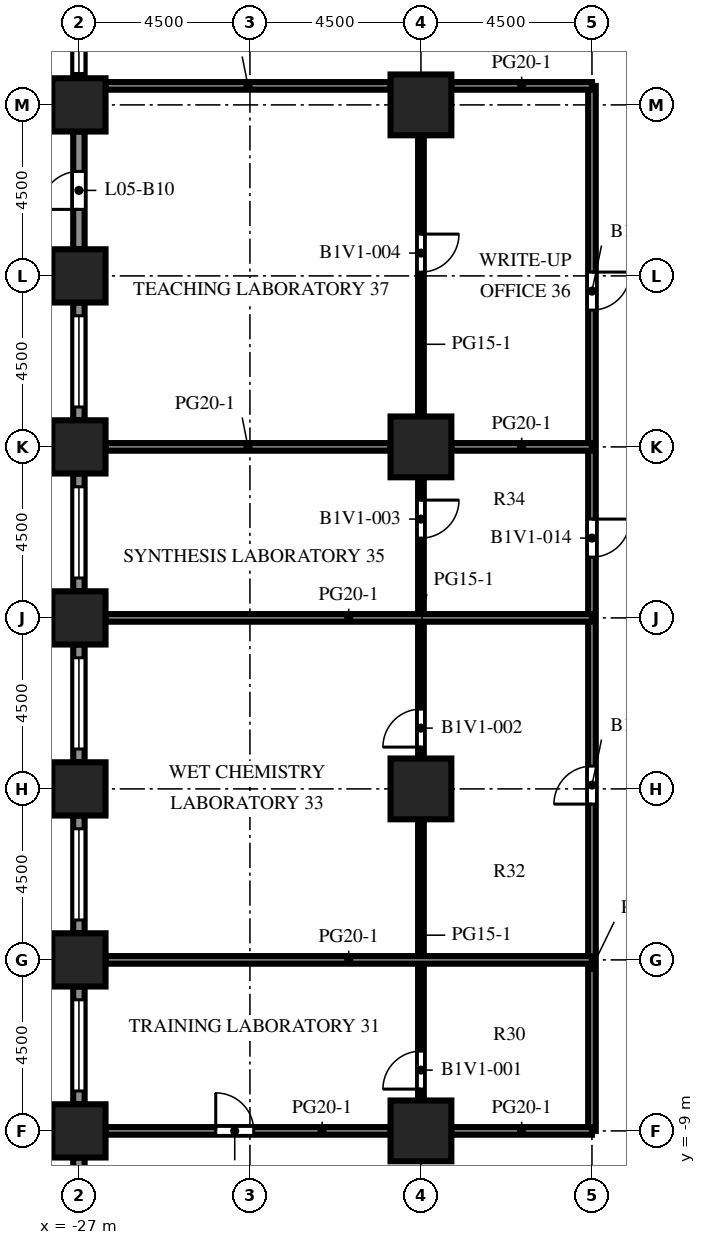
"""IFC4 building model, lengths in metres.
Left out: names, types, materials, properties, quantities, classifications, styles, units other than length and angle.
Written with IfcOpenShell. Run it as: python <this file> out.ifc"""

import sys

from ifc_helpers import new_model, si_unit, direction, frame, frame_2d, origin, origin_2d, place, context, subcontext, project, spatial, rectangle, extrude, element, fill, save


model = new_model("IFC4")
c1 = context("Model", 3, precision=1e-05, world=origin(), true_north=direction((0.0, 1.0)))
c2 = subcontext(c1, "Body", "Model", "MODEL_VIEW")
j1 = project(units=[si_unit("LENGTHUNIT", "METRE"), si_unit("PLANEANGLEUNIT", "RADIAN")], contexts=[c1])
p1 = place(None, origin())
s1 = spatial("IfcSite", under=j1, at=p1, CompositionType="ELEMENT")
p2 = place(p1, origin())
s2 = spatial("IfcBuilding", under=s1, at=p2, CompositionType="ELEMENT")
p3 = place(p2, frame((0.0, 0.0, 23.6)))
s3 = spatial("IfcBuildingStorey", under=s2, at=p3, CompositionType="ELEMENT", Elevation=23.6)
for number, where, z_axis, x_axis in (
    (1, (-27.0, -9.0, 0.0), (0.0, 0.0, 1.0), (1.0, 0.0, 0.0)),
    (2, (-27.0, -4.5, 0.0), (0.0, 0.0, 1.0), (1.0, 0.0, 0.0)),
    (3, (-27.0, 0.0, 0.0), (0.0, 0.0, 1.0), (1.0, 0.0, 0.0)),
    (4, (-27.0, 4.5, 0.0), (0.0, 0.0, 1.0), (1.0, 0.0, 0.0)),
    (5, (-27.0, 9.0, 0.0), (0.0, 0.0, 1.0), (1.0, 0.0, 0.0)),
    (6, (-27.0, 13.5, 0.0), (0.0, 0.0, 1.0), (1.0, 0.0, 0.0)),
    (7, (-27.0, 18.0, 0.0), (0.0, 0.0, 1.0), (1.0, 0.0, 0.0)),
):
    element("IfcColumn", number, at=place(p3, frame(where, z_axis=z_axis, x_axis=x_axis)), inside=s3, PredefinedType="COLUMN", context=c2, shape_type="SweptSolid", body=[
        extrude(rectangle(XDim=1.4, YDim=1.4, at=origin_2d()), origin(), (0.0, 0.0, 1.0), 4.1),
    ])
for number, where, z_axis, x_axis in (
    (8, (-18.0, -9.0, 0.0), (0.0, 0.0, 1.0), (1.0, 0.0, 0.0)),
    (9, (-18.0, 0.0, 0.0), (0.0, 0.0, 1.0), (1.0, 0.0, 0.0)),
    (10, (-18.0, 9.0, 0.0), (0.0, 0.0, 1.0), (1.0, 0.0, 0.0)),
    (11, (-18.0, 18.0, 0.0), (0.0, 0.0, 1.0), (1.0, 0.0, 0.0)),
):
    element("IfcColumn", number, at=place(p3, frame(where, z_axis=z_axis, x_axis=x_axis)), inside=s3, PredefinedType="COLUMN", context=c2, shape_type="SweptSolid", body=[
        extrude(rectangle(XDim=1.6, YDim=1.6, at=origin_2d()), origin(), (0.0, 0.0, 1.0), 4.1),
    ])
p4 = place(p3, frame((-27.0, 18.7, 0.0), z_axis=(0.0, 0.0, 1.0), x_axis=(0.0, 1.0, 0.0)))
e12 = element("IfcWall", 12, at=p4, inside=s3, PredefinedType="SOLIDWALL", context=c2, shape_type="SweptSolid", body=[
    extrude(rectangle(XDim=3.1, YDim=0.3, at=frame_2d((1.55, 0.0))), origin(), (0.0, 0.0, 1.0), 2.75),
])
p5 = place(p4, frame((0.125, 0.0, 0.8)))
e13 = element("IfcOpeningElement", 13, at=p5, cuts=e12, PredefinedType="OPENING", context=c2, shape_type="SweptSolid", body=[
    extrude(rectangle(XDim=2.4, YDim=1.7, at=frame_2d((1.2, 0.85))), frame((0.0, 0.16, 0.0), z_axis=(0.0, -1.0, 0.0), x_axis=(1.0, 0.0, 0.0)), (0.0, 0.0, 1.0), 0.32),
])
p6 = place(p3, frame((-27.0, 14.2, 0.0), z_axis=(0.0, 0.0, 1.0), x_axis=(0.0, 1.0, 0.0)))
e14 = element("IfcWall", 14, at=p6, inside=s3, PredefinedType="SOLIDWALL", context=c2, shape_type="SweptSolid", body=[
    extrude(rectangle(XDim=3.1, YDim=0.3, at=frame_2d((1.55, 0.0))), origin(), (0.0, 0.0, 1.0), 2.75),
])
p7 = place(p6, frame((1.05, 0.0, 0.0)))
e15 = element("IfcOpeningElement", 15, at=p7, cuts=e14, PredefinedType="OPENING", context=c2, shape_type="SweptSolid", body=[
    extrude(rectangle(XDim=1.0, YDim=2.2, at=frame_2d((0.5, 1.1))), frame((0.0, 0.16, 0.0), z_axis=(0.0, -1.0, 0.0), x_axis=(1.0, 0.0, 0.0)), (0.0, 0.0, 1.0), 0.32),
])
p8 = place(p3, frame((-27.0, 9.7, 0.0), z_axis=(0.0, 0.0, 1.0), x_axis=(0.0, 1.0, 0.0)))
e16 = element("IfcWall", 16, at=p8, inside=s3, PredefinedType="SOLIDWALL", context=c2, shape_type="SweptSolid", body=[
    extrude(rectangle(XDim=3.1, YDim=0.3, at=frame_2d((1.55, 0.0))), origin(), (0.0, 0.0, 1.0), 2.75),
])
p9 = place(p8, frame((0.35, 0.0, 0.8)))
e17 = element("IfcOpeningElement", 17, at=p9, cuts=e16, PredefinedType="OPENING", context=c2, shape_type="SweptSolid", body=[
    extrude(rectangle(XDim=2.4, YDim=1.7, at=frame_2d((1.2, 0.85))), frame((0.0, 0.16, 0.0), z_axis=(0.0, -1.0, 0.0), x_axis=(1.0, 0.0, 0.0)), (0.0, 0.0, 1.0), 0.32),
])
p10 = place(p3, frame((-27.0, 5.2, 0.0), z_axis=(0.0, 0.0, 1.0), x_axis=(0.0, 1.0, 0.0)))
e18 = element("IfcWall", 18, at=p10, inside=s3, PredefinedType="SOLIDWALL", context=c2, shape_type="SweptSolid", body=[
    extrude(rectangle(XDim=3.1, YDim=0.3, at=frame_2d((1.55, 0.0))), origin(), (0.0, 0.0, 1.0), 2.75),
])
p11 = place(p10, frame((0.35, 0.0, 0.8)))
e19 = element("IfcOpeningElement", 19, at=p11, cuts=e18, PredefinedType="OPENING", context=c2, shape_type="SweptSolid", body=[
    extrude(rectangle(XDim=2.4, YDim=1.7, at=frame_2d((1.2, 0.85))), frame((0.0, 0.16, 0.0), z_axis=(0.0, -1.0, 0.0), x_axis=(1.0, 0.0, 0.0)), (0.0, 0.0, 1.0), 0.32),
])
p12 = place(p3, frame((-27.0, 0.7, 0.0), z_axis=(0.0, 0.0, 1.0), x_axis=(0.0, 1.0, 0.0)))
e20 = element("IfcWall", 20, at=p12, inside=s3, PredefinedType="SOLIDWALL", context=c2, shape_type="SweptSolid", body=[
    extrude(rectangle(XDim=3.1, YDim=0.3, at=frame_2d((1.55, 0.0))), origin(), (0.0, 0.0, 1.0), 2.75),
])
p13 = place(p12, frame((0.35, 0.0, 0.8)))
e21 = element("IfcOpeningElement", 21, at=p13, cuts=e20, PredefinedType="OPENING", context=c2, shape_type="SweptSolid", body=[
    extrude(rectangle(XDim=2.4, YDim=1.7, at=frame_2d((1.2, 0.85))), frame((0.0, 0.16, 0.0), z_axis=(0.0, -1.0, 0.0), x_axis=(1.0, 0.0, 0.0)), (0.0, 0.0, 1.0), 0.32),
])
p14 = place(p3, frame((-27.0, -3.8, 0.0), z_axis=(0.0, 0.0, 1.0), x_axis=(0.0, 1.0, 0.0)))
e22 = element("IfcWall", 22, at=p14, inside=s3, PredefinedType="SOLIDWALL", context=c2, shape_type="SweptSolid", body=[
    extrude(rectangle(XDim=3.1, YDim=0.3, at=frame_2d((1.55, 0.0))), origin(), (0.0, 0.0, 1.0), 2.75),
])
p15 = place(p14, frame((0.35, 0.0, 0.8)))
e23 = element("IfcOpeningElement", 23, at=p15, cuts=e22, PredefinedType="OPENING", context=c2, shape_type="SweptSolid", body=[
    extrude(rectangle(XDim=2.4, YDim=1.7, at=frame_2d((1.2, 0.85))), frame((0.0, 0.16, 0.0), z_axis=(0.0, -1.0, 0.0), x_axis=(1.0, 0.0, 0.0)), (0.0, 0.0, 1.0), 0.32),
])
p16 = place(p3, frame((-27.0, -8.3, 0.0), z_axis=(0.0, 0.0, 1.0), x_axis=(0.0, 1.0, 0.0)))
e24 = element("IfcWall", 24, at=p16, inside=s3, PredefinedType="SOLIDWALL", context=c2, shape_type="SweptSolid", body=[
    extrude(rectangle(XDim=3.1, YDim=0.3, at=frame_2d((1.55, 0.0))), origin(), (0.0, 0.0, 1.0), 2.75),
])
p17 = place(p16, frame((0.35, 0.0, 0.8)))
e25 = element("IfcOpeningElement", 25, at=p17, cuts=e24, PredefinedType="OPENING", context=c2, shape_type="SweptSolid", body=[
    extrude(rectangle(XDim=2.4, YDim=1.7, at=frame_2d((1.2, 0.85))), frame((0.0, 0.16, 0.0), z_axis=(0.0, -1.0, 0.0), x_axis=(1.0, 0.0, 0.0)), (0.0, 0.0, 1.0), 0.32),
])
p18 = place(p3, frame((-27.0, -12.8, 0.0), z_axis=(0.0, 0.0, 1.0), x_axis=(0.0, 1.0, 0.0)))
e26 = element("IfcWall", 26, at=p18, inside=s3, PredefinedType="SOLIDWALL", context=c2, shape_type="SweptSolid", body=[
    extrude(rectangle(XDim=3.1, YDim=0.3, at=frame_2d((1.55, 0.0))), origin(), (0.0, 0.0, 1.0), 2.75),
])
p19 = place(p18, frame((1.425, 0.0, 0.8)))
e27 = element("IfcOpeningElement", 27, at=p19, cuts=e26, PredefinedType="OPENING", context=c2, shape_type="SweptSolid", body=[
    extrude(rectangle(XDim=1.2, YDim=1.7, at=frame_2d((0.6, 0.85))), frame((0.0, 0.16, 0.0), z_axis=(0.0, -1.0, 0.0), x_axis=(1.0, 0.0, 0.0)), (0.0, 0.0, 1.0), 0.32),
])
p20 = place(p3, frame((-18.0, -0.8, 0.0), z_axis=(0.0, 0.0, 1.0), x_axis=(0.0, -1.0, 0.0)))
e28 = element("IfcWall", 28, at=p20, inside=s3, PredefinedType="PARTITIONING", context=c2, shape_type="SweptSolid", body=[
    extrude(rectangle(XDim=7.4, YDim=0.15, at=frame_2d((3.7, 0.0))), origin(), (0.0, 0.0, 1.0), 3.65),
])
p21 = place(p20, frame((6.1, 0.0, 0.0)))
e29 = element("IfcOpeningElement", 29, at=p21, cuts=e28, PredefinedType="OPENING", context=c2, shape_type="SweptSolid", body=[
    extrude(rectangle(XDim=1.0, YDim=2.1, at=frame_2d((0.5, 1.05))), frame((0.0, 0.085, 0.0), z_axis=(0.0, -1.0, 0.0), x_axis=(1.0, 0.0, 0.0)), (0.0, 0.0, 1.0), 0.17),
])
p22 = place(p3, frame((-18.0, 0.8, 0.0), z_axis=(0.0, 0.0, 1.0), x_axis=(0.0, 1.0, 0.0)))
e30 = element("IfcWall", 30, at=p22, inside=s3, PredefinedType="PARTITIONING", context=c2, shape_type="SweptSolid", body=[
    extrude(rectangle(XDim=7.4, YDim=0.15, at=frame_2d((3.7, 0.0))), origin(), (0.0, 0.0, 1.0), 3.65),
])
p23 = place(p22, frame((0.3, 0.0, 0.0)))
e31 = element("IfcOpeningElement", 31, at=p23, cuts=e30, PredefinedType="OPENING", context=c2, shape_type="SweptSolid", body=[
    extrude(rectangle(XDim=1.0, YDim=2.1, at=frame_2d((0.5, 1.05))), frame((0.0, 0.085, 0.0), z_axis=(0.0, -1.0, 0.0), x_axis=(1.0, 0.0, 0.0)), (0.0, 0.0, 1.0), 0.17),
])
p24 = place(p22, frame((5.8, 0.0, 0.0)))
e32 = element("IfcOpeningElement", 32, at=p24, cuts=e30, PredefinedType="OPENING", context=c2, shape_type="SweptSolid", body=[
    extrude(rectangle(XDim=1.0, YDim=2.1, at=frame_2d((0.5, 1.05))), frame((0.0, 0.085, 0.0), z_axis=(0.0, -1.0, 0.0), x_axis=(1.0, 0.0, 0.0)), (0.0, 0.0, 1.0), 0.17),
])
p25 = place(p3, frame((-18.0, 9.8, 0.0), z_axis=(0.0, 0.0, 1.0), x_axis=(0.0, 1.0, 0.0)))
e33 = element("IfcWall", 33, at=p25, inside=s3, PredefinedType="PARTITIONING", context=c2, shape_type="SweptSolid", body=[
    extrude(rectangle(XDim=7.4, YDim=0.15, at=frame_2d((3.7, 0.0))), origin(), (0.0, 0.0, 1.0), 3.65),
])
p26 = place(p25, frame((3.8, 0.0, 0.0)))
e34 = element("IfcOpeningElement", 34, at=p26, cuts=e33, PredefinedType="OPENING", context=c2, shape_type="SweptSolid", body=[
    extrude(rectangle(XDim=1.0, YDim=2.1, at=frame_2d((0.5, 1.05))), frame((0.0, 0.085, 0.0), z_axis=(0.0, -1.0, 0.0), x_axis=(1.0, 0.0, 0.0)), (0.0, 0.0, 1.0), 0.17),
])
p27 = place(p3, frame((-13.5, -9.0, 0.0), z_axis=(0.0, 0.0, 1.0), x_axis=(0.0, 1.0, 0.0)))
e35 = element("IfcWall", 35, at=p27, inside=s3, PredefinedType="PARTITIONING", context=c2, shape_type="SweptSolid", body=[
    extrude(rectangle(XDim=27.5, YDim=0.2, at=frame_2d((13.75, 0.0))), origin(), (0.0, 0.0, 1.0), 3.65),
])
p28 = place(p27, frame((8.6, 0.0, 0.0)))
e36 = element("IfcOpeningElement", 36, at=p28, cuts=e35, PredefinedType="OPENING", context=c2, shape_type="SweptSolid", body=[
    extrude(rectangle(XDim=1.0, YDim=2.1, at=frame_2d((0.5, 1.05))), frame((0.0, 0.11, 0.0), z_axis=(0.0, -1.0, 0.0), x_axis=(1.0, 0.0, 0.0)), (0.0, 0.0, 1.0), 0.22),
])
p29 = place(p27, frame((15.1, 0.0, 0.0)))
e37 = element("IfcOpeningElement", 37, at=p29, cuts=e35, PredefinedType="OPENING", context=c2, shape_type="SweptSolid", body=[
    extrude(rectangle(XDim=1.0, YDim=2.1, at=frame_2d((0.5, 1.05))), frame((0.0, 0.11, 0.0), z_axis=(0.0, -1.0, 0.0), x_axis=(1.0, 0.0, 0.0)), (0.0, 0.0, 1.0), 0.22),
])
p30 = place(p27, frame((21.6, 0.0, 0.0)))
e38 = element("IfcOpeningElement", 38, at=p30, cuts=e35, PredefinedType="OPENING", context=c2, shape_type="SweptSolid", body=[
    extrude(rectangle(XDim=1.0, YDim=2.1, at=frame_2d((0.5, 1.05))), frame((0.0, 0.11, 0.0), z_axis=(0.0, -1.0, 0.0), x_axis=(1.0, 0.0, 0.0)), (0.0, 0.0, 1.0), 0.22),
])
p31 = place(p3, frame((-26.3, -9.0, 0.0), z_axis=(0.0, 0.0, 1.0), x_axis=(1.0, 0.0, 0.0)))
e39 = element("IfcWall", 39, at=p31, inside=s3, PredefinedType="PARTITIONING", context=c2, shape_type="SweptSolid", body=[
    extrude(rectangle(XDim=7.5, YDim=0.2, at=frame_2d((3.75, 0.0))), origin(), (0.0, 0.0, 1.0), 3.65),
])
p32 = place(p31, frame((2.9, 0.0, 0.0)))
e40 = element("IfcOpeningElement", 40, at=p32, cuts=e39, PredefinedType="OPENING", context=c2, shape_type="SweptSolid", body=[
    extrude(rectangle(XDim=1.0, YDim=2.1, at=frame_2d((0.5, 1.05))), frame((0.0, 0.11, 0.0), z_axis=(0.0, -1.0, 0.0), x_axis=(1.0, 0.0, 0.0)), (0.0, 0.0, 1.0), 0.22),
])
p33 = place(p3, frame((-17.2, -9.0, 0.0), z_axis=(0.0, 0.0, 1.0), x_axis=(1.0, 0.0, 0.0)))
e41 = element("IfcWall", 41, at=p33, inside=s3, PredefinedType="PARTITIONING", context=c2, shape_type="SweptSolid", body=[
    extrude(rectangle(XDim=3.7, YDim=0.2, at=frame_2d((1.85, 0.0))), origin(), (0.0, 0.0, 1.0), 3.65),
])
for number, where, z_axis, x_axis in (
    (42, (-26.3, -4.5, 0.0), (0.0, 0.0, 1.0), (1.0, 0.0, 0.0)),
    (43, (-26.3, 4.5, 0.0), (0.0, 0.0, 1.0), (1.0, 0.0, 0.0)),
):
    element("IfcWall", number, at=place(p3, frame(where, z_axis=z_axis, x_axis=x_axis)), inside=s3, PredefinedType="PARTITIONING", context=c2, shape_type="SweptSolid", body=[
        extrude(rectangle(XDim=12.8, YDim=0.2, at=frame_2d((6.4, 0.0))), origin(), (0.0, 0.0, 1.0), 3.65),
    ])
p34 = place(p3, frame((-26.3, 9.0, 0.0), z_axis=(0.0, 0.0, 1.0), x_axis=(1.0, 0.0, 0.0)))
e44 = element("IfcWall", 44, at=p34, inside=s3, PredefinedType="PARTITIONING", context=c2, shape_type="SweptSolid", body=[
    extrude(rectangle(XDim=7.5, YDim=0.2, at=frame_2d((3.75, 0.0))), origin(), (0.0, 0.0, 1.0), 3.65),
])
p35 = place(p3, frame((-17.2, 9.0, 0.0), z_axis=(0.0, 0.0, 1.0), x_axis=(1.0, 0.0, 0.0)))
e45 = element("IfcWall", 45, at=p35, inside=s3, PredefinedType="PARTITIONING", context=c2, shape_type="SweptSolid", body=[
    extrude(rectangle(XDim=3.7, YDim=0.2, at=frame_2d((1.85, 0.0))), origin(), (0.0, 0.0, 1.0), 3.65),
])
p36 = place(p3, frame((-26.3, 18.5, 0.0), z_axis=(0.0, 0.0, 1.0), x_axis=(1.0, 0.0, 0.0)))
e46 = element("IfcWall", 46, at=p36, inside=s3, PredefinedType="PARTITIONING", context=c2, shape_type="SweptSolid", body=[
    extrude(rectangle(XDim=7.5, YDim=0.2, at=frame_2d((3.75, 0.0))), origin(), (0.0, 0.0, 1.0), 3.65),
])
p37 = place(p3, frame((-17.2, 18.5, 0.0), z_axis=(0.0, 0.0, 1.0), x_axis=(1.0, 0.0, 0.0)))
e47 = element("IfcWall", 47, at=p37, inside=s3, PredefinedType="PARTITIONING", context=c2, shape_type="SweptSolid", body=[
    extrude(rectangle(XDim=3.7, YDim=0.2, at=frame_2d((1.85, 0.0))), origin(), (0.0, 0.0, 1.0), 3.65),
])
p38 = place(p5, origin())
e48 = element("IfcWindow", 48, at=p38, inside=s3, PartitioningType="SINGLE_PANEL", PredefinedType="WINDOW", context=c2, shape_type="SweptSolid", body=[
    extrude(rectangle(XDim=2.4, YDim=1.7, at=frame_2d((1.2, 0.85))), frame((0.0, 0.03, 0.0), z_axis=(0.0, -1.0, 0.0), x_axis=(1.0, 0.0, 0.0)), (0.0, 0.0, 1.0), 0.06),
])
fill(e13, e48)
p39 = place(p7, origin())
e49 = element("IfcDoor", 49, at=p39, inside=s3, OperationType="SINGLE_SWING_LEFT", PredefinedType="DOOR", context=c2, shape_type="SweptSolid", body=[
    extrude(rectangle(XDim=1.0, YDim=2.2, at=frame_2d((0.5, 1.1))), frame((0.0, 0.025, 0.0), z_axis=(0.0, -1.0, 0.0), x_axis=(1.0, 0.0, 0.0)), (0.0, 0.0, 1.0), 0.05),
])
fill(e15, e49)
p40 = place(p9, origin())
e50 = element("IfcWindow", 50, at=p40, inside=s3, PartitioningType="SINGLE_PANEL", PredefinedType="WINDOW", context=c2, shape_type="SweptSolid", body=[
    extrude(rectangle(XDim=2.4, YDim=1.7, at=frame_2d((1.2, 0.85))), frame((0.0, 0.03, 0.0), z_axis=(0.0, -1.0, 0.0), x_axis=(1.0, 0.0, 0.0)), (0.0, 0.0, 1.0), 0.06),
])
fill(e17, e50)
p41 = place(p11, origin())
e51 = element("IfcWindow", 51, at=p41, inside=s3, PartitioningType="SINGLE_PANEL", PredefinedType="WINDOW", context=c2, shape_type="SweptSolid", body=[
    extrude(rectangle(XDim=2.4, YDim=1.7, at=frame_2d((1.2, 0.85))), frame((0.0, 0.03, 0.0), z_axis=(0.0, -1.0, 0.0), x_axis=(1.0, 0.0, 0.0)), (0.0, 0.0, 1.0), 0.06),
])
fill(e19, e51)
p42 = place(p13, origin())
e52 = element("IfcWindow", 52, at=p42, inside=s3, PartitioningType="SINGLE_PANEL", PredefinedType="WINDOW", context=c2, shape_type="SweptSolid", body=[
    extrude(rectangle(XDim=2.4, YDim=1.7, at=frame_2d((1.2, 0.85))), frame((0.0, 0.03, 0.0), z_axis=(0.0, -1.0, 0.0), x_axis=(1.0, 0.0, 0.0)), (0.0, 0.0, 1.0), 0.06),
])
fill(e21, e52)
p43 = place(p15, origin())
e53 = element("IfcWindow", 53, at=p43, inside=s3, PartitioningType="SINGLE_PANEL", PredefinedType="WINDOW", context=c2, shape_type="SweptSolid", body=[
    extrude(rectangle(XDim=2.4, YDim=1.7, at=frame_2d((1.2, 0.85))), frame((0.0, 0.03, 0.0), z_axis=(0.0, -1.0, 0.0), x_axis=(1.0, 0.0, 0.0)), (0.0, 0.0, 1.0), 0.06),
])
fill(e23, e53)
p44 = place(p17, origin())
e54 = element("IfcWindow", 54, at=p44, inside=s3, PartitioningType="SINGLE_PANEL", PredefinedType="WINDOW", context=c2, shape_type="SweptSolid", body=[
    extrude(rectangle(XDim=2.4, YDim=1.7, at=frame_2d((1.2, 0.85))), frame((0.0, 0.03, 0.0), z_axis=(0.0, -1.0, 0.0), x_axis=(1.0, 0.0, 0.0)), (0.0, 0.0, 1.0), 0.06),
])
fill(e25, e54)
p45 = place(p21, origin())
e55 = element("IfcDoor", 55, at=p45, inside=s3, OperationType="SINGLE_SWING_RIGHT", PredefinedType="DOOR", context=c2, shape_type="SweptSolid", body=[
    extrude(rectangle(XDim=1.0, YDim=2.1, at=frame_2d((0.5, 1.05))), frame((0.0, 0.025, 0.0), z_axis=(0.0, -1.0, 0.0), x_axis=(1.0, 0.0, 0.0)), (0.0, 0.0, 1.0), 0.05),
])
fill(e29, e55)
p46 = place(p23, origin())
e56 = element("IfcDoor", 56, at=p46, inside=s3, OperationType="SINGLE_SWING_LEFT", PredefinedType="DOOR", context=c2, shape_type="SweptSolid", body=[
    extrude(rectangle(XDim=1.0, YDim=2.1, at=frame_2d((0.5, 1.05))), frame((0.0, 0.025, 0.0), z_axis=(0.0, -1.0, 0.0), x_axis=(1.0, 0.0, 0.0)), (0.0, 0.0, 1.0), 0.05),
])
fill(e31, e56)
p47 = place(p24, origin())
e57 = element("IfcDoor", 57, at=p47, inside=s3, OperationType="SINGLE_SWING_RIGHT", PredefinedType="DOOR", context=c2, shape_type="SweptSolid", body=[
    extrude(rectangle(XDim=1.0, YDim=2.1, at=frame_2d((0.5, 1.05))), frame((0.0, 0.025, 0.0), z_axis=(0.0, -1.0, 0.0), x_axis=(1.0, 0.0, 0.0)), (0.0, 0.0, 1.0), 0.05),
])
fill(e32, e57)
p48 = place(p26, origin())
e58 = element("IfcDoor", 58, at=p48, inside=s3, OperationType="SINGLE_SWING_RIGHT", PredefinedType="DOOR", context=c2, shape_type="SweptSolid", body=[
    extrude(rectangle(XDim=1.0, YDim=2.1, at=frame_2d((0.5, 1.05))), frame((0.0, 0.025, 0.0), z_axis=(0.0, -1.0, 0.0), x_axis=(1.0, 0.0, 0.0)), (0.0, 0.0, 1.0), 0.05),
])
fill(e34, e58)
p49 = place(p28, origin())
e59 = element("IfcDoor", 59, at=p49, inside=s3, OperationType="SINGLE_SWING_LEFT", PredefinedType="DOOR", context=c2, shape_type="SweptSolid", body=[
    extrude(rectangle(XDim=1.0, YDim=2.1, at=frame_2d((0.5, 1.05))), frame((0.0, 0.025, 0.0), z_axis=(0.0, -1.0, 0.0), x_axis=(1.0, 0.0, 0.0)), (0.0, 0.0, 1.0), 0.05),
])
fill(e36, e59)
p50 = place(p29, origin())
e60 = element("IfcDoor", 60, at=p50, inside=s3, OperationType="SINGLE_SWING_RIGHT", PredefinedType="DOOR", context=c2, shape_type="SweptSolid", body=[
    extrude(rectangle(XDim=1.0, YDim=2.1, at=frame_2d((0.5, 1.05))), frame((0.0, 0.025, 0.0), z_axis=(0.0, -1.0, 0.0), x_axis=(1.0, 0.0, 0.0)), (0.0, 0.0, 1.0), 0.05),
])
fill(e37, e60)
p51 = place(p30, origin())
e61 = element("IfcDoor", 61, at=p51, inside=s3, OperationType="SINGLE_SWING_RIGHT", PredefinedType="DOOR", context=c2, shape_type="SweptSolid", body=[
    extrude(rectangle(XDim=1.0, YDim=2.1, at=frame_2d((0.5, 1.05))), frame((0.0, 0.025, 0.0), z_axis=(0.0, -1.0, 0.0), x_axis=(1.0, 0.0, 0.0)), (0.0, 0.0, 1.0), 0.05),
])
fill(e38, e61)
p52 = place(p32, origin())
e62 = element("IfcDoor", 62, at=p52, inside=s3, OperationType="SINGLE_SWING_LEFT", PredefinedType="DOOR", context=c2, shape_type="SweptSolid", body=[
    extrude(rectangle(XDim=1.0, YDim=2.1, at=frame_2d((0.5, 1.05))), frame((0.0, 0.025, 0.0), z_axis=(0.0, -1.0, 0.0), x_axis=(1.0, 0.0, 0.0)), (0.0, 0.0, 1.0), 0.05),
])
fill(e40, e62)
save(model, sys.argv[1])
